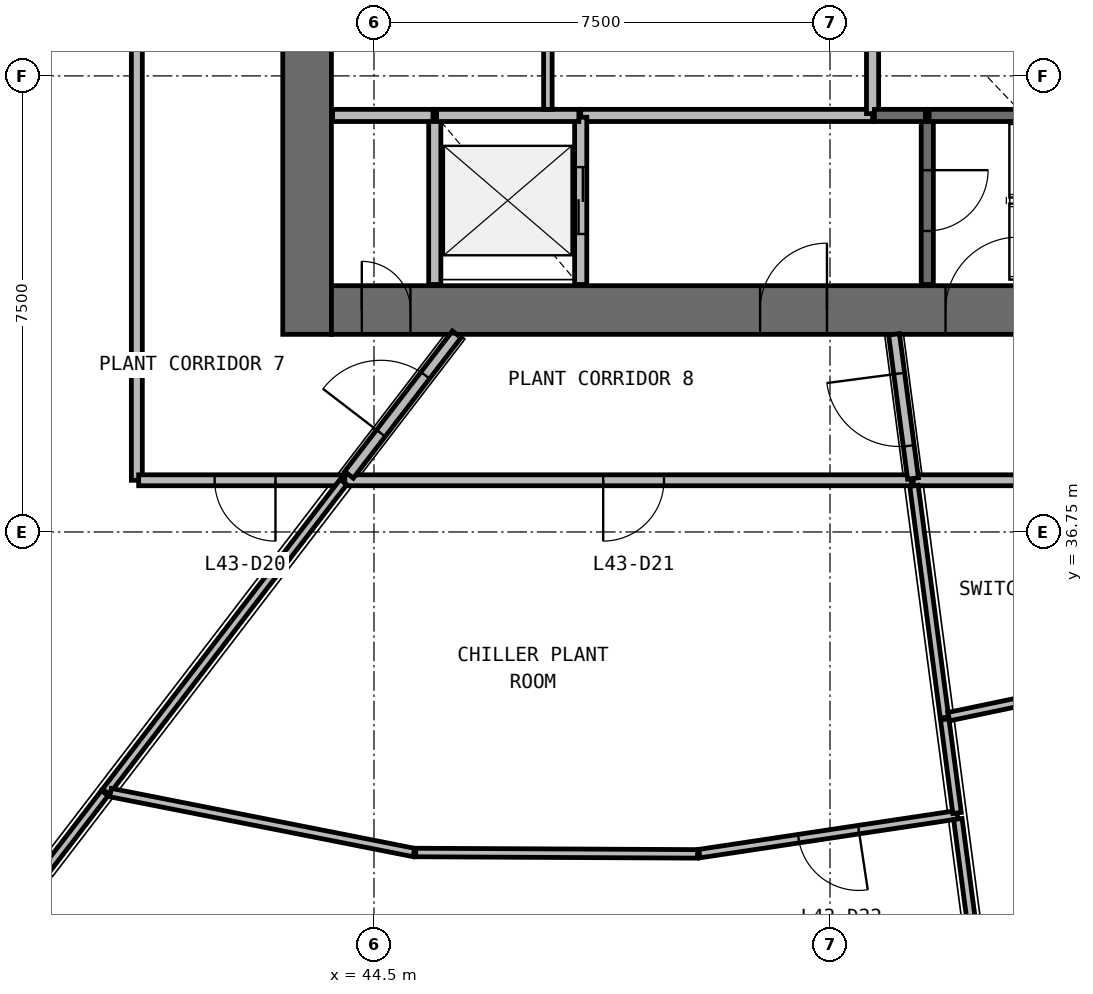
"""IFC4 building model, lengths in metres.
Left out: names, types, materials, properties, quantities, classifications, styles, units other than length and angle.
Written with IfcOpenShell. Run it as: python <this file> out.ifc"""

import sys

from ifc_helpers import new_model, si_unit, direction, frame, frame_2d, origin, place, context, subcontext, project, spatial, rectangle, extrude, source, transform, mapped, element, fill, save


model = new_model("IFC4")
c1 = context("Model", 3, precision=1e-05, world=origin(), true_north=direction((0.0, 1.0)))
c2 = subcontext(c1, "Body", "Model", "MODEL_VIEW")
j1 = project(units=[si_unit("LENGTHUNIT", "METRE"), si_unit("PLANEANGLEUNIT", "RADIAN")], contexts=[c1])
p1 = place(None, origin())
s1 = spatial("IfcSite", under=j1, at=p1, CompositionType="ELEMENT")
p2 = place(p1, origin())
s2 = spatial("IfcBuilding", under=s1, at=p2, CompositionType="ELEMENT")
p3 = place(p2, frame((0.0, 0.0, 179.9)))
s3 = spatial("IfcBuildingStorey", under=s2, at=p3, CompositionType="ELEMENT", Elevation=179.9)
p4 = place(p3, frame((43.4, 56.0, 0.0), z_axis=(0.0, 0.0, 1.0), x_axis=(0.0, -1.0, 0.0)))
e1 = element("IfcWall", 1, at=p4, inside=s3, PredefinedType="SHEAR", context=c2, shape_type="SweptSolid", body=[
    extrude(rectangle(XDim=16.0, YDim=0.8, at=frame_2d((8.0, 0.0))), origin(), (0.0, 0.0, 1.0), 3.9),
])
p5 = place(p4, frame((7.1, 0.0, 0.0)))
e2 = element("IfcOpeningElement", 2, at=p5, cuts=e1, PredefinedType="OPENING", context=c2, shape_type="SweptSolid", body=[
    extrude(rectangle(XDim=1.8, YDim=2.1, at=frame_2d((0.9, 1.05))), frame((0.0, 0.41, 0.0), z_axis=(0.0, -1.0, 0.0), x_axis=(1.0, 0.0, 0.0)), (0.0, 0.0, 1.0), 0.82),
])
p6 = place(p3, frame((43.8, 40.4, 0.0), z_axis=(0.0, 0.0, 1.0), x_axis=(1.0, 0.0, 0.0)))
e3 = element("IfcWall", 3, at=p6, inside=s3, PredefinedType="SHEAR", context=c2, shape_type="SweptSolid", body=[
    extrude(rectangle(XDim=16.4, YDim=0.8, at=frame_2d((8.2, 0.0))), origin(), (0.0, 0.0, 1.0), 3.9),
])
p7 = place(p6, frame((10.1, 0.0, 0.0)))
e4 = element("IfcOpeningElement", 4, at=p7, cuts=e3, PredefinedType="OPENING", context=c2, shape_type="SweptSolid", body=[
    extrude(rectangle(XDim=1.2, YDim=2.1, at=frame_2d((0.6, 1.05))), frame((0.0, 0.41, 0.0), z_axis=(0.0, -1.0, 0.0), x_axis=(1.0, 0.0, 0.0)), (0.0, 0.0, 1.0), 0.82),
])
p8 = place(p6, frame((7.05, 0.0, 0.0)))
e5 = element("IfcOpeningElement", 5, at=p8, cuts=e3, PredefinedType="OPENING", context=c2, shape_type="SweptSolid", body=[
    extrude(rectangle(XDim=1.1, YDim=2.1, at=frame_2d((0.55, 1.05))), frame((0.0, 0.41, 0.0), z_axis=(0.0, -1.0, 0.0), x_axis=(1.0, 0.0, 0.0)), (0.0, 0.0, 1.0), 0.82),
])
p9 = place(p6, frame((0.5, 0.0, 0.0)))
e6 = element("IfcOpeningElement", 6, at=p9, cuts=e3, PredefinedType="OPENING", context=c2, shape_type="SweptSolid", body=[
    extrude(rectangle(XDim=0.8, YDim=2.1, at=frame_2d((0.4, 1.05))), frame((0.0, 0.41, 0.0), z_axis=(0.0, -1.0, 0.0), x_axis=(1.0, 0.0, 0.0)), (0.0, 0.0, 1.0), 0.82),
])
p10 = place(p3, frame((52.7, 43.6, 0.0), z_axis=(0.0, 0.0, 1.0), x_axis=(-1.0, 0.0, 0.0)))
e7 = element("IfcWall", 7, at=p10, inside=s3, PredefinedType="SOLIDWALL", context=c2, shape_type="SweptSolid", body=[
    extrude(rectangle(XDim=4.8, YDim=0.2, at=frame_2d((2.4, 0.0))), origin(), (0.0, 0.0, 1.0), 3.58),
])
p11 = place(p3, frame((45.5, 43.6, 0.0), z_axis=(0.0, 0.0, 1.0), x_axis=(0.0, -1.0, 0.0)))
e8 = element("IfcWall", 8, at=p11, inside=s3, PredefinedType="SOLIDWALL", context=c2, shape_type="SweptSolid", body=[
    extrude(rectangle(XDim=2.78, YDim=0.2, at=frame_2d((1.39, 0.0))), origin(), (0.0, 0.0, 1.0), 3.58),
])
p12 = place(p3, frame((47.9, 40.82, 0.0), z_axis=(0.0, 0.0, 1.0), x_axis=(0.0, 1.0, 0.0)))
e9 = element("IfcWall", 9, at=p12, inside=s3, PredefinedType="SOLIDWALL", context=c2, shape_type="SweptSolid", body=[
    extrude(rectangle(XDim=2.75, YDim=0.2, at=frame_2d((1.375, 0.0))), origin(), (0.0, 0.0, 1.0), 3.58),
])
p13 = place(p12, frame((0.83, 0.0, 0.0)))
e10 = element("IfcOpeningElement", 10, at=p13, cuts=e9, PredefinedType="OPENING", context=c2, shape_type="SweptSolid", body=[
    extrude(rectangle(XDim=1.1, YDim=2.1, at=frame_2d((0.55, 1.05))), frame((0.0, 0.11, 0.0), z_axis=(0.0, -1.0, 0.0), x_axis=(1.0, 0.0, 0.0)), (0.0, 0.0, 1.0), 0.22),
])
p14 = place(p3, frame((53.6, 43.6, 0.0), z_axis=(0.0, 0.0, 1.0), x_axis=(0.0, -1.0, 0.0)))
e11 = element("IfcWall", 11, at=p14, inside=s3, PredefinedType="SOLIDWALL", context=c2, shape_type="SweptSolid", body=[
    extrude(rectangle(XDim=2.78, YDim=0.2, at=frame_2d((1.39, 0.0))), origin(), (0.0, 0.0, 1.0), 3.58),
])
p15 = place(p14, frame((0.9, 0.0, 0.0)))
e12 = element("IfcOpeningElement", 12, at=p15, cuts=e11, PredefinedType="OPENING", context=c2, shape_type="SweptSolid", body=[
    extrude(rectangle(XDim=1.0, YDim=2.1, at=frame_2d((0.5, 1.05))), frame((0.0, 0.11, 0.0), z_axis=(0.0, -1.0, 0.0), x_axis=(1.0, 0.0, 0.0)), (0.0, 0.0, 1.0), 0.22),
])
p16 = place(p3, frame((47.87, 43.6, 0.0), z_axis=(0.0, 0.0, 1.0), x_axis=(-1.0, 0.0, 0.0)))
e13 = element("IfcWall", 13, at=p16, inside=s3, PredefinedType="SOLIDWALL", context=c2, shape_type="SweptSolid", body=[
    extrude(rectangle(XDim=2.34, YDim=0.2, at=frame_2d((1.17, 0.0))), origin(), (0.0, 0.0, 1.0), 3.58),
])
p17 = place(p3, frame((52.7, 45.99, 0.0), z_axis=(0.0, 0.0, 1.0), x_axis=(0.0, -1.0, 0.0)))
e14 = element("IfcWall", 14, at=p17, inside=s3, PredefinedType="SOLIDWALL", context=c2, shape_type="SweptSolid", body=[
    extrude(rectangle(XDim=2.36, YDim=0.2, at=frame_2d((1.18, 0.0))), origin(), (0.0, 0.0, 1.0), 3.58),
])
p18 = place(p3, frame((45.47, 43.6, 0.0), z_axis=(0.0, 0.0, 1.0), x_axis=(-1.0, 0.0, 0.0)))
e15 = element("IfcWall", 15, at=p18, inside=s3, PredefinedType="SOLIDWALL", context=c2, shape_type="SweptSolid", body=[
    extrude(rectangle(XDim=1.65, YDim=0.2, at=frame_2d((0.825, 0.0))), origin(), (0.0, 0.0, 1.0), 3.58),
])
p19 = place(p3, frame((53.63, 43.6, 0.0), z_axis=(0.0, 0.0, 1.0), x_axis=(1.0, 0.0, 0.0)))
e16 = element("IfcWall", 16, at=p19, inside=s3, PredefinedType="SOLIDWALL", context=c2, shape_type="SweptSolid", body=[
    extrude(rectangle(XDim=1.54, YDim=0.2, at=frame_2d((0.77, 0.0))), origin(), (0.0, 0.0, 1.0), 3.58),
])
p20 = place(p3, frame((52.73, 43.6, 0.0), z_axis=(0.0, 0.0, 1.0), x_axis=(1.0, 0.0, 0.0)))
e17 = element("IfcWall", 17, at=p20, inside=s3, PredefinedType="SOLIDWALL", context=c2, shape_type="SweptSolid", body=[
    extrude(rectangle(XDim=0.84, YDim=0.2, at=frame_2d((0.42, 0.0))), origin(), (0.0, 0.0, 1.0), 3.58),
])
p21 = place(p3, frame((63.4, 37.6, 0.0), z_axis=(0.0, 0.0, 1.0), x_axis=(-1.0, 0.0, 0.0)))
e18 = element("IfcWall", 18, at=p21, inside=s3, PredefinedType="PARTITIONING", context=c2, shape_type="SweptSolid", body=[
    extrude(rectangle(XDim=10.031, YDim=0.18, at=frame_2d((5.015, 0.0))), origin(), (0.0, 0.0, 1.0), 2.38),
])
p22 = place(p21, frame((4.581, 0.0, 0.0)))
e19 = element("IfcOpeningElement", 19, at=p22, cuts=e18, PredefinedType="OPENING", context=c2, shape_type="SweptSolid", body=[
    extrude(rectangle(XDim=1.0, YDim=2.1, at=frame_2d((0.5, 1.05))), frame((0.0, 0.1, 0.0), z_axis=(0.0, -1.0, 0.0), x_axis=(1.0, 0.0, 0.0)), (0.0, 0.0, 1.0), 0.2),
])
p23 = place(p3, frame((53.339, 37.6, 0.0), z_axis=(0.0, 0.0, 1.0), x_axis=(-1.0, 0.0, 0.0)))
e20 = element("IfcWall", 20, at=p23, inside=s3, PredefinedType="PARTITIONING", context=c2, shape_type="SweptSolid", body=[
    extrude(rectangle(XDim=9.319, YDim=0.18, at=frame_2d((4.66, 0.0))), origin(), (0.0, 0.0, 1.0), 2.38),
])
p24 = place(p23, frame((4.069, 0.0, 0.0)))
e21 = element("IfcOpeningElement", 21, at=p24, cuts=e20, PredefinedType="OPENING", context=c2, shape_type="SweptSolid", body=[
    extrude(rectangle(XDim=1.0, YDim=2.1, at=frame_2d((0.5, 1.05))), frame((0.0, 0.1, 0.0), z_axis=(0.0, -1.0, 0.0), x_axis=(1.0, 0.0, 0.0)), (0.0, 0.0, 1.0), 0.2),
])
p25 = place(p3, frame((40.6, 46.469, 0.0), z_axis=(0.0, 0.0, 1.0), x_axis=(0.0, -1.0, 0.0)))
e22 = element("IfcWall", 22, at=p25, inside=s3, PredefinedType="PARTITIONING", context=c2, shape_type="SweptSolid", body=[
    extrude(rectangle(XDim=8.869, YDim=0.18, at=frame_2d((4.435, 0.0))), origin(), (0.0, 0.0, 1.0), 2.38),
])
p26 = place(p3, frame((43.99, 37.6, 0.0), z_axis=(0.0, 0.0, 1.0), x_axis=(-1.0, 0.0, 0.0)))
e23 = element("IfcWall", 23, at=p26, inside=s3, PredefinedType="PARTITIONING", context=c2, shape_type="SweptSolid", body=[
    extrude(rectangle(XDim=3.36, YDim=0.18, at=frame_2d((1.68, 0.0))), origin(), (0.0, 0.0, 1.0), 2.38),
])
p27 = place(p26, frame((1.11, 0.0, 0.0)))
e24 = element("IfcOpeningElement", 24, at=p27, cuts=e23, PredefinedType="OPENING", context=c2, shape_type="SweptSolid", body=[
    extrude(rectangle(XDim=1.0, YDim=2.1, at=frame_2d((0.5, 1.05))), frame((0.0, 0.1, 0.0), z_axis=(0.0, -1.0, 0.0), x_axis=(1.0, 0.0, 0.0)), (0.0, 0.0, 1.0), 0.2),
])
p28 = place(p3, frame((44.089, 37.69, 0.0), z_axis=(0.0, 0.0, 1.0), x_axis=(0.608737787706, 0.793371480341, 0.0)))
e25 = element("IfcWall", 25, at=p28, inside=s3, PredefinedType="PARTITIONING", context=c2, shape_type="SweptSolid", body=[
    extrude(rectangle(XDim=2.912, YDim=0.18, at=frame_2d((1.456, 0.0))), origin(), (0.0, 0.0, 1.0), 2.38),
])
p29 = place(p28, frame((0.862, 0.0, 0.0)))
e26 = element("IfcOpeningElement", 26, at=p29, cuts=e25, PredefinedType="OPENING", context=c2, shape_type="SweptSolid", body=[
    extrude(rectangle(XDim=1.2, YDim=2.1, at=frame_2d((0.6, 1.05))), frame((0.0, 0.1, 0.0), z_axis=(0.0, -1.0, 0.0), x_axis=(1.0, 0.0, 0.0)), (0.0, 0.0, 1.0), 0.2),
])
p30 = place(p3, frame((53.365, 37.63, 0.0), z_axis=(0.0, 0.0, 1.0), x_axis=(-0.130504701654, 0.991447690424, 0.0)))
e27 = element("IfcWall", 27, at=p30, inside=s3, PredefinedType="PARTITIONING", context=c2, shape_type="SweptSolid", body=[
    extrude(rectangle(XDim=2.391, YDim=0.18, at=frame_2d((1.195, 0.0))), origin(), (0.0, 0.0, 1.0), 2.38),
])
p31 = place(p30, frame((0.541, 0.0, 0.0)))
e28 = element("IfcOpeningElement", 28, at=p31, cuts=e27, PredefinedType="OPENING", context=c2, shape_type="SweptSolid", body=[
    extrude(rectangle(XDim=1.2, YDim=2.1, at=frame_2d((0.6, 1.05))), frame((0.0, 0.1, 0.0), z_axis=(0.0, -1.0, 0.0), x_axis=(1.0, 0.0, 0.0)), (0.0, 0.0, 1.0), 0.2),
])
p32 = place(p3, frame((43.998, 37.571, 0.0), z_axis=(0.0, 0.0, 1.0), x_axis=(-0.608770902547, -0.7933460709, 0.0)))
e29 = element("IfcWall", 29, at=p32, inside=s3, PredefinedType="PARTITIONING", context=c2, shape_type="SweptSolid", body=[
    extrude(rectangle(XDim=6.418, YDim=0.14, at=frame_2d((3.209, 0.0))), origin(), (0.0, 0.0, 1.0), 2.38),
])
p33 = place(p3, frame((40.167, 32.464, 0.0), z_axis=(0.0, 0.0, 1.0), x_axis=(0.981032247985, -0.193844598618, 0.0)))
e30 = element("IfcWall", 30, at=p33, inside=s3, PredefinedType="PARTITIONING", context=c2, shape_type="SweptSolid", body=[
    extrude(rectangle(XDim=5.086, YDim=0.14, at=frame_2d((2.543, 0.0))), origin(), (0.0, 0.0, 1.0), 2.38),
])
p34 = place(p3, frame((45.187, 31.479, 0.0), z_axis=(0.0, 0.0, 1.0), x_axis=(0.999988261157, -0.004845363671, 0.0)))
e31 = element("IfcWall", 31, at=p34, inside=s3, PredefinedType="PARTITIONING", context=c2, shape_type="SweptSolid", body=[
    extrude(rectangle(XDim=4.635, YDim=0.14, at=frame_2d((2.318, 0.0))), origin(), (0.0, 0.0, 1.0), 2.38),
])
p35 = place(p3, frame((54.094, 32.099, 0.0), z_axis=(0.0, 0.0, 1.0), x_axis=(-0.988863178372, -0.148827465407, 0.0)))
e32 = element("IfcWall", 32, at=p35, inside=s3, PredefinedType="PARTITIONING", context=c2, shape_type="SweptSolid", body=[
    extrude(rectangle(XDim=4.29, YDim=0.14, at=frame_2d((2.145, 0.0))), origin(), (0.0, 0.0, 1.0), 2.38),
])
p36 = place(p35, frame((1.64, 0.0, 0.0)))
e33 = element("IfcOpeningElement", 33, at=p36, cuts=e32, PredefinedType="OPENING", context=c2, shape_type="SweptSolid", body=[
    extrude(rectangle(XDim=1.0, YDim=2.1, at=frame_2d((0.5, 1.05))), frame((0.0, 0.08, 0.0), z_axis=(0.0, -1.0, 0.0), x_axis=(1.0, 0.0, 0.0)), (0.0, 0.0, 1.0), 0.16),
])
p37 = place(p3, frame((40.073, 32.456, 0.0), z_axis=(0.0, 0.0, 1.0), x_axis=(-0.608817875064, -0.793310024519, 0.0)))
e34 = element("IfcWall", 34, at=p37, inside=s3, PredefinedType="PARTITIONING", context=c2, shape_type="SweptSolid", body=[
    extrude(rectangle(XDim=3.926, YDim=0.14, at=frame_2d((1.963, 0.0))), origin(), (0.0, 0.0, 1.0), 2.38),
])
p38 = place(p3, frame((53.381, 37.51, 0.0), z_axis=(0.0, 0.0, 1.0), x_axis=(0.130503795096, -0.991447809754, 0.0)))
e35 = element("IfcWall", 35, at=p38, inside=s3, PredefinedType="PARTITIONING", context=c2, shape_type="SweptSolid", body=[
    extrude(rectangle(XDim=3.844, YDim=0.14, at=frame_2d((1.922, 0.0))), origin(), (0.0, 0.0, 1.0), 2.38),
])
p39 = place(p3, frame((53.951, 33.713, 0.0), z_axis=(0.0, 0.0, 1.0), x_axis=(0.978877627359, 0.204447036308, 0.0)))
e36 = element("IfcWall", 36, at=p39, inside=s3, PredefinedType="PARTITIONING", context=c2, shape_type="SweptSolid", body=[
    extrude(rectangle(XDim=3.699, YDim=0.14, at=frame_2d((1.85, 0.0))), origin(), (0.0, 0.0, 1.0), 2.38),
])
p40 = place(p3, frame((54.103, 32.03, 0.0), z_axis=(0.0, 0.0, 1.0), x_axis=(0.130501257376, -0.991448143789, 0.0)))
e37 = element("IfcWall", 37, at=p40, inside=s3, PredefinedType="PARTITIONING", context=c2, shape_type="SweptSolid", body=[
    extrude(rectangle(XDim=3.107, YDim=0.14, at=frame_2d((1.554, 0.0))), origin(), (0.0, 0.0, 1.0), 2.38),
])
p41 = place(p3, frame((47.36, 43.7, 0.0), z_axis=(0.0, 0.0, 1.0), x_axis=(0.0, 1.0, 0.0)))
e38 = element("IfcWall", 38, at=p41, inside=s3, PredefinedType="PARTITIONING", context=c2, shape_type="SweptSolid", body=[
    extrude(rectangle(XDim=2.29, YDim=0.14, at=frame_2d((1.145, 0.0))), origin(), (0.0, 0.0, 1.0), 2.88),
])
p42 = place(p3, frame((53.887, 33.669, 0.0), z_axis=(0.0, 0.0, 1.0), x_axis=(0.130609007081, -0.991433955072, 0.0)))
e39 = element("IfcWall", 39, at=p42, inside=s3, PredefinedType="PARTITIONING", context=c2, shape_type="SweptSolid", body=[
    extrude(rectangle(XDim=1.553, YDim=0.14, at=frame_2d((0.777, 0.0))), origin(), (0.0, 0.0, 1.0), 2.38),
])
m1 = source(origin(), c2, "Body", "SweptSolid", [
    extrude(rectangle(XDim=1.1, YDim=2.1, at=frame_2d((0.55, 1.05))), frame((0.0, 0.025, 0.0), z_axis=(0.0, -1.0, 0.0), x_axis=(1.0, 0.0, 0.0)), (0.0, 0.0, 1.0), 0.05),
])
p43 = place(p13, origin())
e40 = element("IfcDoor", 40, at=p43, inside=s3, OperationType="DOUBLE_DOOR_SLIDING", PredefinedType="USERDEFINED", context=c2, shape_type="MappedRepresentation", body=[
    mapped(m1, transform((0.0, 0.0, 0.0), scale=1.0)),
])
fill(e10, e40)
m2 = source(origin(), c2, "Body", "SweptSolid", [
    extrude(rectangle(XDim=1.2, YDim=2.1, at=frame_2d((0.6, 1.05))), frame((0.0, 0.025, 0.0), z_axis=(0.0, -1.0, 0.0), x_axis=(1.0, 0.0, 0.0)), (0.0, 0.0, 1.0), 0.05),
])
p44 = place(p7, origin())
e41 = element("IfcDoor", 41, at=p44, inside=s3, OperationType="SINGLE_SWING_RIGHT", PredefinedType="DOOR", context=c2, shape_type="MappedRepresentation", body=[
    mapped(m2, transform((0.0, 0.0, 0.0), scale=1.0)),
])
fill(e4, e41)
m3 = source(origin(), c2, "Body", "SweptSolid", [
    extrude(rectangle(XDim=1.0, YDim=2.1, at=frame_2d((0.5, 1.05))), frame((0.0, 0.025, 0.0), z_axis=(0.0, -1.0, 0.0), x_axis=(1.0, 0.0, 0.0)), (0.0, 0.0, 1.0), 0.05),
])
p45 = place(p15, origin())
e42 = element("IfcDoor", 42, at=p45, inside=s3, OperationType="SINGLE_SWING_LEFT", PredefinedType="DOOR", context=c2, shape_type="MappedRepresentation", body=[
    mapped(m3, transform((0.0, 0.0, 0.0), scale=1.0)),
])
fill(e12, e42)
m4 = source(origin(), c2, "Body", "SweptSolid", [
    extrude(rectangle(XDim=1.1, YDim=2.1, at=frame_2d((0.55, 1.05))), frame((0.0, 0.025, 0.0), z_axis=(0.0, -1.0, 0.0), x_axis=(1.0, 0.0, 0.0)), (0.0, 0.0, 1.0), 0.05),
])
p46 = place(p8, origin())
e43 = element("IfcDoor", 43, at=p46, inside=s3, OperationType="SINGLE_SWING_RIGHT", PredefinedType="DOOR", context=c2, shape_type="MappedRepresentation", body=[
    mapped(m4, transform((0.0, 0.0, 0.0), scale=1.0)),
])
fill(e5, e43)
m5 = source(origin(), c2, "Body", "SweptSolid", [
    extrude(rectangle(XDim=0.8, YDim=2.1, at=frame_2d((0.4, 1.05))), frame((0.0, 0.025, 0.0), z_axis=(0.0, -1.0, 0.0), x_axis=(1.0, 0.0, 0.0)), (0.0, 0.0, 1.0), 0.05),
])
p47 = place(p9, origin())
e44 = element("IfcDoor", 44, at=p47, inside=s3, OperationType="SINGLE_SWING_LEFT", PredefinedType="DOOR", context=c2, shape_type="MappedRepresentation", body=[
    mapped(m5, transform((0.0, 0.0, 0.0), scale=1.0)),
])
fill(e6, e44)
m6 = source(origin(), c2, "Body", "SweptSolid", [
    extrude(rectangle(XDim=1.0, YDim=2.1, at=frame_2d((0.5, 1.05))), frame((0.0, 0.025, 0.0), z_axis=(0.0, -1.0, 0.0), x_axis=(1.0, 0.0, 0.0)), (0.0, 0.0, 1.0), 0.05),
])
p48 = place(p27, origin())
e45 = element("IfcDoor", 45, at=p48, inside=s3, OperationType="SINGLE_SWING_LEFT", PredefinedType="DOOR", context=c2, shape_type="MappedRepresentation", body=[
    mapped(m6, transform((0.0, 0.0, 0.0), scale=1.0)),
])
fill(e24, e45)
p49 = place(p24, origin())
e46 = element("IfcDoor", 46, at=p49, inside=s3, OperationType="SINGLE_SWING_RIGHT", PredefinedType="DOOR", context=c2, shape_type="MappedRepresentation", body=[
    mapped(m6, transform((0.0, 0.0, 0.0), scale=1.0)),
])
fill(e21, e46)
p50 = place(p36, origin())
e47 = element("IfcDoor", 47, at=p50, inside=s3, OperationType="SINGLE_SWING_LEFT", PredefinedType="DOOR", context=c2, shape_type="MappedRepresentation", body=[
    mapped(m6, transform((0.0, 0.0, 0.0), scale=1.0)),
])
fill(e33, e47)
m7 = source(origin(), c2, "Body", "SweptSolid", [
    extrude(rectangle(XDim=1.2, YDim=2.1, at=frame_2d((0.6, 1.05))), frame((0.0, 0.025, 0.0), z_axis=(0.0, -1.0, 0.0), x_axis=(1.0, 0.0, 0.0)), (0.0, 0.0, 1.0), 0.05),
])
p51 = place(p29, origin())
e48 = element("IfcDoor", 48, at=p51, inside=s3, OperationType="SINGLE_SWING_LEFT", PredefinedType="DOOR", context=c2, shape_type="MappedRepresentation", body=[
    mapped(m7, transform((0.0, 0.0, 0.0), scale=1.0)),
])
fill(e26, e48)
p52 = place(p31, origin())
e49 = element("IfcDoor", 49, at=p52, inside=s3, OperationType="SINGLE_SWING_RIGHT", PredefinedType="DOOR", context=c2, shape_type="MappedRepresentation", body=[
    mapped(m7, transform((0.0, 0.0, 0.0), scale=1.0)),
])
fill(e28, e49)
save(model, sys.argv[1])
